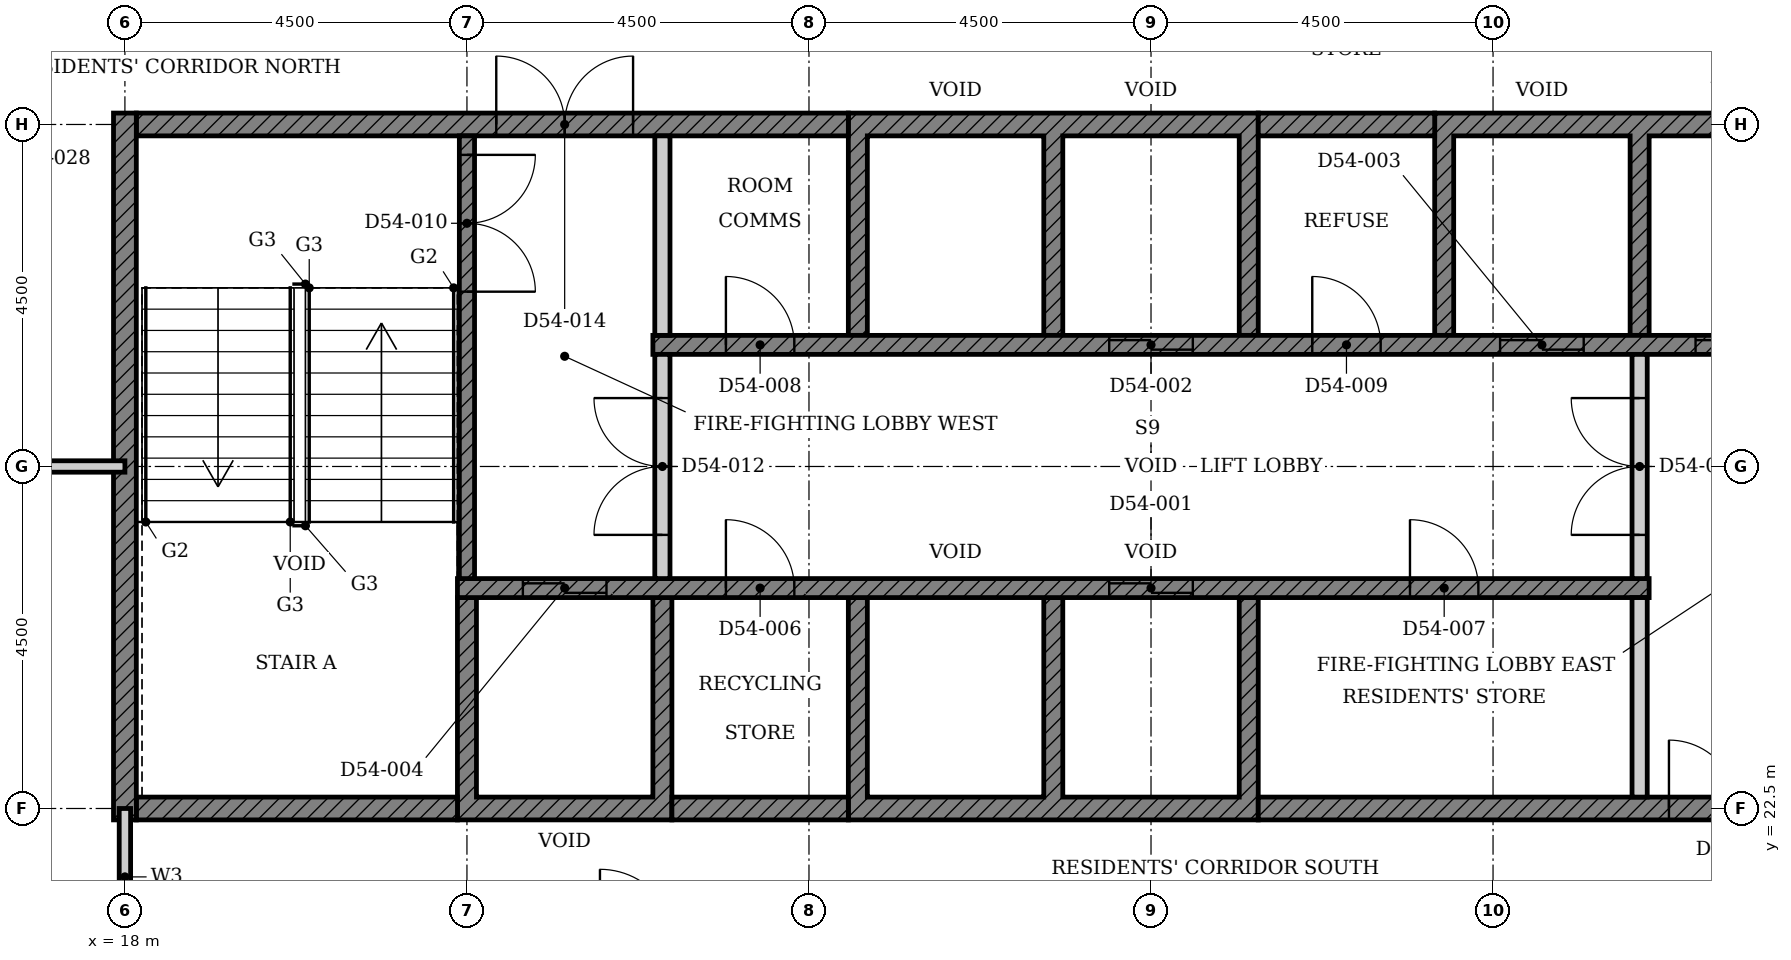
"""IFC4 building model, lengths in metres.
Left out: names, types, materials, properties, quantities, classifications, styles, units other than length and angle.
Written with IfcOpenShell. Run it as: python <this file> out.ifc"""

import sys

from ifc_helpers import new_model, si_unit, direction, frame, frame_2d, origin, place, context, subcontext, project, spatial, polyline, rectangle, outline, extrude, element, fill, save


model = new_model("IFC4")
c1 = context("Model", 3, precision=1e-05, world=origin(), true_north=direction((0.0, 1.0)))
c2 = subcontext(c1, "Body", "Model", "MODEL_VIEW")
j1 = project(units=[si_unit("LENGTHUNIT", "METRE"), si_unit("PLANEANGLEUNIT", "RADIAN")], contexts=[c1])
p1 = place(None, origin())
s1 = spatial("IfcSite", under=j1, at=p1, CompositionType="ELEMENT")
p2 = place(p1, origin())
s2 = spatial("IfcBuilding", under=s1, at=p2, CompositionType="ELEMENT")
p3 = place(p2, frame((0.0, 0.0, 214.6)))
s3 = spatial("IfcBuildingStorey", under=s2, at=p3, CompositionType="ELEMENT", Elevation=214.6)
p4 = place(p3, origin())
e1 = element("IfcWall", 1, at=p4, inside=s3, PredefinedType="SHEAR", context=c2, shape_type="SweptSolid", body=[
    extrude(outline(polyline([(22.375, 22.35), (25.197, 22.35), (25.197, 25.275), (24.947, 25.275), (24.947, 22.65), (22.625, 22.65), (22.625, 25.275), (22.375, 25.275), (22.375, 22.35)])), origin(), (0.0, 0.0, 1.0), 3.4),
])
p5 = place(p3, origin())
e2 = element("IfcWall", 2, at=p5, inside=s3, PredefinedType="SHEAR", context=c2, shape_type="SweptSolid", body=[
    extrude(outline(polyline([(27.518, 22.35), (32.911, 22.35), (32.911, 25.275), (32.661, 25.275), (32.661, 22.65), (30.339, 22.65), (30.339, 25.275), (30.089, 25.275), (30.089, 22.65), (27.768, 22.65), (27.768, 25.275), (27.518, 25.275), (27.518, 22.35)])), origin(), (0.0, 0.0, 1.0), 3.4),
])
p6 = place(p3, origin())
e3 = element("IfcWall", 3, at=p6, inside=s3, PredefinedType="SHEAR", context=c2, shape_type="SweptSolid", body=[
    extrude(outline(polyline([(27.518, 28.725), (27.768, 28.725), (27.768, 31.35), (30.089, 31.35), (30.089, 28.725), (30.339, 28.725), (30.339, 31.35), (32.661, 31.35), (32.661, 28.725), (32.911, 28.725), (32.911, 31.65), (27.518, 31.65), (27.518, 28.725)])), origin(), (0.0, 0.0, 1.0), 3.4),
])
p7 = place(p3, origin())
e4 = element("IfcWall", 4, at=p7, inside=s3, PredefinedType="SHEAR", context=c2, shape_type="SweptSolid", body=[
    extrude(outline(polyline([(35.232, 28.725), (35.482, 28.725), (35.482, 31.35), (37.803, 31.35), (37.803, 28.725), (38.053, 28.725), (38.053, 31.35), (40.375, 31.35), (40.375, 28.725), (40.625, 28.725), (40.625, 31.65), (35.232, 31.65), (35.232, 28.725)])), origin(), (0.0, 0.0, 1.0), 3.4),
])
p8 = place(p3, frame((18.15, 22.5, 0.0), z_axis=(0.0, 0.0, 1.0), x_axis=(1.0, 0.0, 0.0)))
e5 = element("IfcWall", 5, at=p8, inside=s3, PredefinedType="SHEAR", context=c2, shape_type="SweptSolid", body=[
    extrude(rectangle(XDim=4.225, YDim=0.3, at=frame_2d((2.113, 0.0))), origin(), (0.0, 0.0, 1.0), 3.4),
])
p9 = place(p3, frame((25.197, 22.5, 0.0), z_axis=(0.0, 0.0, 1.0), x_axis=(1.0, 0.0, 0.0)))
e6 = element("IfcWall", 6, at=p9, inside=s3, PredefinedType="SHEAR", context=c2, shape_type="SweptSolid", body=[
    extrude(rectangle(XDim=2.321, YDim=0.3, at=frame_2d((1.161, 0.0))), origin(), (0.0, 0.0, 1.0), 3.4),
])
p10 = place(p3, frame((32.911, 22.5, 0.0), z_axis=(0.0, 0.0, 1.0), x_axis=(1.0, 0.0, 0.0)))
e7 = element("IfcWall", 7, at=p10, inside=s3, PredefinedType="SHEAR", context=c2, shape_type="SweptSolid", body=[
    extrude(rectangle(XDim=11.939, YDim=0.3, at=frame_2d((5.97, 0.0))), origin(), (0.0, 0.0, 1.0), 3.4),
])
p11 = place(p10, frame((5.404, 0.0, 0.0)))
e8 = element("IfcOpeningElement", 8, at=p11, cuts=e7, PredefinedType="OPENING", context=c2, shape_type="SweptSolid", body=[
    extrude(rectangle(XDim=1.8, YDim=2.1, at=frame_2d((0.9, 1.05))), frame((0.0, 0.16, 0.0), z_axis=(0.0, -1.0, 0.0), x_axis=(1.0, 0.0, 0.0)), (0.0, 0.0, 1.0), 0.32),
])
p12 = place(p3, frame((18.15, 31.5, 0.0), z_axis=(0.0, 0.0, 1.0), x_axis=(1.0, 0.0, 0.0)))
e9 = element("IfcWall", 9, at=p12, inside=s3, PredefinedType="SHEAR", context=c2, shape_type="SweptSolid", body=[
    extrude(rectangle(XDim=9.368, YDim=0.3, at=frame_2d((4.684, 0.0))), origin(), (0.0, 0.0, 1.0), 3.4),
])
p13 = place(p12, frame((4.736, 0.0, 0.0)))
e10 = element("IfcOpeningElement", 10, at=p13, cuts=e9, PredefinedType="OPENING", context=c2, shape_type="SweptSolid", body=[
    extrude(rectangle(XDim=1.8, YDim=2.1, at=frame_2d((0.9, 1.05))), frame((0.0, 0.16, 0.0), z_axis=(0.0, -1.0, 0.0), x_axis=(1.0, 0.0, 0.0)), (0.0, 0.0, 1.0), 0.32),
])
p14 = place(p3, frame((32.911, 31.5, 0.0), z_axis=(0.0, 0.0, 1.0), x_axis=(1.0, 0.0, 0.0)))
e11 = element("IfcWall", 11, at=p14, inside=s3, PredefinedType="SHEAR", context=c2, shape_type="SweptSolid", body=[
    extrude(rectangle(XDim=2.322, YDim=0.3, at=frame_2d((1.161, 0.0))), origin(), (0.0, 0.0, 1.0), 3.4),
])
p15 = place(p3, frame((18.0, 22.35, 0.0), z_axis=(0.0, 0.0, 1.0), x_axis=(0.0, 1.0, 0.0)))
e12 = element("IfcWall", 12, at=p15, inside=s3, PredefinedType="SHEAR", context=c2, shape_type="SweptSolid", body=[
    extrude(rectangle(XDim=9.3, YDim=0.3, at=frame_2d((4.65, 0.0))), origin(), (0.0, 0.0, 1.0), 3.4),
])
p16 = place(p3, frame((22.375, 25.4, 0.0), z_axis=(0.0, 0.0, 1.0), x_axis=(1.0, 0.0, 0.0)))
e13 = element("IfcWall", 13, at=p16, inside=s3, PredefinedType="SHEAR", context=c2, shape_type="SweptSolid", body=[
    extrude(rectangle(XDim=15.678, YDim=0.25, at=frame_2d((7.839, 0.0))), origin(), (0.0, 0.0, 1.0), 3.4),
])
p17 = place(p16, frame((8.575, 0.0, 0.0)))
e14 = element("IfcOpeningElement", 14, at=p17, cuts=e13, PredefinedType="OPENING", context=c2, shape_type="SweptSolid", body=[
    extrude(rectangle(XDim=1.1, YDim=2.1, at=frame_2d((0.55, 1.05))), frame((0.0, 0.135, 0.0), z_axis=(0.0, -1.0, 0.0), x_axis=(1.0, 0.0, 0.0)), (0.0, 0.0, 1.0), 0.27),
])
p18 = place(p16, frame((0.861, 0.0, 0.0)))
e15 = element("IfcOpeningElement", 15, at=p18, cuts=e13, PredefinedType="OPENING", context=c2, shape_type="SweptSolid", body=[
    extrude(rectangle(XDim=1.1, YDim=2.1, at=frame_2d((0.55, 1.05))), frame((0.0, 0.135, 0.0), z_axis=(0.0, -1.0, 0.0), x_axis=(1.0, 0.0, 0.0)), (0.0, 0.0, 1.0), 0.27),
])
p19 = place(p16, frame((3.532, 0.0, 0.0)))
e16 = element("IfcOpeningElement", 16, at=p19, cuts=e13, PredefinedType="OPENING", context=c2, shape_type="SweptSolid", body=[
    extrude(rectangle(XDim=0.9, YDim=2.1, at=frame_2d((0.45, 1.05))), frame((0.0, 0.135, 0.0), z_axis=(0.0, -1.0, 0.0), x_axis=(1.0, 0.0, 0.0)), (0.0, 0.0, 1.0), 0.27),
])
p20 = place(p16, frame((12.532, 0.0, 0.0)))
e17 = element("IfcOpeningElement", 17, at=p20, cuts=e13, PredefinedType="OPENING", context=c2, shape_type="SweptSolid", body=[
    extrude(rectangle(XDim=0.9, YDim=2.1, at=frame_2d((0.45, 1.05))), frame((0.0, 0.135, 0.0), z_axis=(0.0, -1.0, 0.0), x_axis=(1.0, 0.0, 0.0)), (0.0, 0.0, 1.0), 0.27),
])
p21 = place(p3, frame((24.947, 28.6, 0.0), z_axis=(0.0, 0.0, 1.0), x_axis=(1.0, 0.0, 0.0)))
e18 = element("IfcWall", 18, at=p21, inside=s3, PredefinedType="SHEAR", context=c2, shape_type="SweptSolid", body=[
    extrude(rectangle(XDim=15.678, YDim=0.25, at=frame_2d((7.839, 0.0))), origin(), (0.0, 0.0, 1.0), 3.4),
])
p22 = place(p21, frame((6.004, 0.0, 0.0)))
e19 = element("IfcOpeningElement", 19, at=p22, cuts=e18, PredefinedType="OPENING", context=c2, shape_type="SweptSolid", body=[
    extrude(rectangle(XDim=1.1, YDim=2.1, at=frame_2d((0.55, 1.05))), frame((0.0, 0.135, 0.0), z_axis=(0.0, -1.0, 0.0), x_axis=(1.0, 0.0, 0.0)), (0.0, 0.0, 1.0), 0.27),
])
p23 = place(p21, frame((11.146, 0.0, 0.0)))
e20 = element("IfcOpeningElement", 20, at=p23, cuts=e18, PredefinedType="OPENING", context=c2, shape_type="SweptSolid", body=[
    extrude(rectangle(XDim=1.1, YDim=2.1, at=frame_2d((0.55, 1.05))), frame((0.0, 0.135, 0.0), z_axis=(0.0, -1.0, 0.0), x_axis=(1.0, 0.0, 0.0)), (0.0, 0.0, 1.0), 0.27),
])
p24 = place(p21, frame((13.718, 0.0, 0.0)))
e21 = element("IfcOpeningElement", 21, at=p24, cuts=e18, PredefinedType="OPENING", context=c2, shape_type="SweptSolid", body=[
    extrude(rectangle(XDim=1.1, YDim=2.1, at=frame_2d((0.55, 1.05))), frame((0.0, 0.135, 0.0), z_axis=(0.0, -1.0, 0.0), x_axis=(1.0, 0.0, 0.0)), (0.0, 0.0, 1.0), 0.27),
])
p25 = place(p21, frame((0.961, 0.0, 0.0)))
e22 = element("IfcOpeningElement", 22, at=p25, cuts=e18, PredefinedType="OPENING", context=c2, shape_type="SweptSolid", body=[
    extrude(rectangle(XDim=0.9, YDim=2.1, at=frame_2d((0.45, 1.05))), frame((0.0, 0.135, 0.0), z_axis=(0.0, -1.0, 0.0), x_axis=(1.0, 0.0, 0.0)), (0.0, 0.0, 1.0), 0.27),
])
p26 = place(p21, frame((8.675, 0.0, 0.0)))
e23 = element("IfcOpeningElement", 23, at=p26, cuts=e18, PredefinedType="OPENING", context=c2, shape_type="SweptSolid", body=[
    extrude(rectangle(XDim=0.9, YDim=2.1, at=frame_2d((0.45, 1.05))), frame((0.0, 0.135, 0.0), z_axis=(0.0, -1.0, 0.0), x_axis=(1.0, 0.0, 0.0)), (0.0, 0.0, 1.0), 0.27),
])
for number, where, z_axis, x_axis in (
    (24, (37.928, 22.65, 0.0), (0.0, 0.0, 1.0), (0.0, 1.0, 0.0)),
    (25, (25.072, 28.725, 0.0), (0.0, 0.0, 1.0), (0.0, 1.0, 0.0)),
):
    element("IfcWall", number, at=place(p3, frame(where, z_axis=z_axis, x_axis=x_axis)), inside=s3, PredefinedType="PARTITIONING", context=c2, shape_type="SweptSolid", body=[
        extrude(rectangle(XDim=2.625, YDim=0.2, at=frame_2d((1.312, 0.0))), origin(), (0.0, 0.0, 1.0), 3.4),
    ])
p27 = place(p3, frame((22.5, 31.35, 0.0), z_axis=(0.0, 0.0, 1.0), x_axis=(0.0, -1.0, 0.0)))
e26 = element("IfcWall", 26, at=p27, inside=s3, PredefinedType="SHEAR", context=c2, shape_type="SweptSolid", body=[
    extrude(rectangle(XDim=5.825, YDim=0.2, at=frame_2d((2.913, 0.0))), origin(), (0.0, 0.0, 1.0), 3.4),
])
p28 = place(p27, frame((0.25, 0.0, 0.0)))
e27 = element("IfcOpeningElement", 27, at=p28, cuts=e26, PredefinedType="OPENING", context=c2, shape_type="SweptSolid", body=[
    extrude(rectangle(XDim=1.8, YDim=2.1, at=frame_2d((0.9, 1.05))), frame((0.0, 0.11, 0.0), z_axis=(0.0, -1.0, 0.0), x_axis=(1.0, 0.0, 0.0)), (0.0, 0.0, 1.0), 0.22),
])
p29 = place(p3, frame((25.072, 25.525, 0.0), z_axis=(0.0, 0.0, 1.0), x_axis=(0.0, 1.0, 0.0)))
e28 = element("IfcWall", 28, at=p29, inside=s3, PredefinedType="PARTITIONING", context=c2, shape_type="SweptSolid", body=[
    extrude(rectangle(XDim=2.95, YDim=0.2, at=frame_2d((1.475, 0.0))), origin(), (0.0, 0.0, 1.0), 3.4),
])
p30 = place(p29, frame((0.575, 0.0, 0.0)))
e29 = element("IfcOpeningElement", 29, at=p30, cuts=e28, PredefinedType="OPENING", context=c2, shape_type="SweptSolid", body=[
    extrude(rectangle(XDim=1.8, YDim=2.1, at=frame_2d((0.9, 1.05))), frame((0.0, 0.11, 0.0), z_axis=(0.0, -1.0, 0.0), x_axis=(1.0, 0.0, 0.0)), (0.0, 0.0, 1.0), 0.22),
])
p31 = place(p3, frame((37.928, 25.525, 0.0), z_axis=(0.0, 0.0, 1.0), x_axis=(0.0, 1.0, 0.0)))
e30 = element("IfcWall", 30, at=p31, inside=s3, PredefinedType="PARTITIONING", context=c2, shape_type="SweptSolid", body=[
    extrude(rectangle(XDim=2.95, YDim=0.2, at=frame_2d((1.475, 0.0))), origin(), (0.0, 0.0, 1.0), 3.4),
])
p32 = place(p31, frame((0.575, 0.0, 0.0)))
e31 = element("IfcOpeningElement", 31, at=p32, cuts=e30, PredefinedType="OPENING", context=c2, shape_type="SweptSolid", body=[
    extrude(rectangle(XDim=1.8, YDim=2.1, at=frame_2d((0.9, 1.05))), frame((0.0, 0.11, 0.0), z_axis=(0.0, -1.0, 0.0), x_axis=(1.0, 0.0, 0.0)), (0.0, 0.0, 1.0), 0.22),
])
p33 = place(p3, frame((4.5, 27.0, 0.0), z_axis=(0.0, 0.0, 1.0), x_axis=(1.0, 0.0, 0.0)))
e32 = element("IfcWall", 32, at=p33, inside=s3, PredefinedType="PARTITIONING", context=c2, shape_type="SweptSolid", body=[
    extrude(rectangle(XDim=13.5, YDim=0.15, at=frame_2d((6.75, 0.0))), origin(), (0.0, 0.0, 1.0), 2.68),
])
p34 = place(p33, frame((5.35, 0.0, 0.0)))
e33 = element("IfcOpeningElement", 33, at=p34, cuts=e32, PredefinedType="OPENING", context=c2, shape_type="SweptSolid", body=[
    extrude(rectangle(XDim=1.0, YDim=2.1, at=frame_2d((0.5, 1.05))), frame((0.0, 0.085, 0.0), z_axis=(0.0, -1.0, 0.0), x_axis=(1.0, 0.0, 0.0)), (0.0, 0.0, 1.0), 0.17),
])
p35 = place(p3, frame((18.0, 20.7, 0.0), z_axis=(0.0, 0.0, 1.0), x_axis=(0.0, 1.0, 0.0)))
e34 = element("IfcWall", 34, at=p35, inside=s3, PredefinedType="PARTITIONING", context=c2, shape_type="SweptSolid", body=[
    extrude(rectangle(XDim=1.8, YDim=0.15, at=frame_2d((0.9, 0.0))), origin(), (0.0, 0.0, 1.0), 3.4),
])
p36 = place(p17, origin())
e35 = element("IfcDoor", 35, at=p36, inside=s3, OperationType="DOUBLE_DOOR_SLIDING", PredefinedType="DOOR", context=c2, shape_type="SweptSolid", body=[
    extrude(rectangle(XDim=1.1, YDim=2.1, at=frame_2d((0.55, 1.05))), frame((0.0, 0.025, 0.0), z_axis=(0.0, -1.0, 0.0), x_axis=(1.0, 0.0, 0.0)), (0.0, 0.0, 1.0), 0.05),
])
fill(e14, e35)
p37 = place(p22, origin())
e36 = element("IfcDoor", 36, at=p37, inside=s3, OperationType="DOUBLE_DOOR_SLIDING", PredefinedType="DOOR", context=c2, shape_type="SweptSolid", body=[
    extrude(rectangle(XDim=1.1, YDim=2.1, at=frame_2d((0.55, 1.05))), frame((0.0, 0.025, 0.0), z_axis=(0.0, -1.0, 0.0), x_axis=(1.0, 0.0, 0.0)), (0.0, 0.0, 1.0), 0.05),
])
fill(e19, e36)
p38 = place(p23, origin())
e37 = element("IfcDoor", 37, at=p38, inside=s3, OperationType="DOUBLE_DOOR_SLIDING", PredefinedType="DOOR", context=c2, shape_type="SweptSolid", body=[
    extrude(rectangle(XDim=1.1, YDim=2.1, at=frame_2d((0.55, 1.05))), frame((0.0, 0.025, 0.0), z_axis=(0.0, -1.0, 0.0), x_axis=(1.0, 0.0, 0.0)), (0.0, 0.0, 1.0), 0.05),
])
fill(e20, e37)
p39 = place(p18, origin())
e38 = element("IfcDoor", 38, at=p39, inside=s3, OperationType="DOUBLE_DOOR_SLIDING", PredefinedType="DOOR", context=c2, shape_type="SweptSolid", body=[
    extrude(rectangle(XDim=1.1, YDim=2.1, at=frame_2d((0.55, 1.05))), frame((0.0, 0.025, 0.0), z_axis=(0.0, -1.0, 0.0), x_axis=(1.0, 0.0, 0.0)), (0.0, 0.0, 1.0), 0.05),
])
fill(e15, e38)
p40 = place(p24, origin())
e39 = element("IfcDoor", 39, at=p40, inside=s3, OperationType="DOUBLE_DOOR_SLIDING", PredefinedType="DOOR", context=c2, shape_type="SweptSolid", body=[
    extrude(rectangle(XDim=1.1, YDim=2.1, at=frame_2d((0.55, 1.05))), frame((0.0, 0.025, 0.0), z_axis=(0.0, -1.0, 0.0), x_axis=(1.0, 0.0, 0.0)), (0.0, 0.0, 1.0), 0.05),
])
fill(e21, e39)
p41 = place(p19, origin())
e40 = element("IfcDoor", 40, at=p41, inside=s3, OperationType="SINGLE_SWING_LEFT", PredefinedType="DOOR", context=c2, shape_type="SweptSolid", body=[
    extrude(rectangle(XDim=0.9, YDim=2.1, at=frame_2d((0.45, 1.05))), frame((0.0, 0.025, 0.0), z_axis=(0.0, -1.0, 0.0), x_axis=(1.0, 0.0, 0.0)), (0.0, 0.0, 1.0), 0.05),
])
fill(e16, e40)
p42 = place(p20, origin())
e41 = element("IfcDoor", 41, at=p42, inside=s3, OperationType="SINGLE_SWING_LEFT", PredefinedType="DOOR", context=c2, shape_type="SweptSolid", body=[
    extrude(rectangle(XDim=0.9, YDim=2.1, at=frame_2d((0.45, 1.05))), frame((0.0, 0.025, 0.0), z_axis=(0.0, -1.0, 0.0), x_axis=(1.0, 0.0, 0.0)), (0.0, 0.0, 1.0), 0.05),
])
fill(e17, e41)
p43 = place(p25, origin())
e42 = element("IfcDoor", 42, at=p43, inside=s3, OperationType="SINGLE_SWING_LEFT", PredefinedType="DOOR", context=c2, shape_type="SweptSolid", body=[
    extrude(rectangle(XDim=0.9, YDim=2.1, at=frame_2d((0.45, 1.05))), frame((0.0, 0.025, 0.0), z_axis=(0.0, -1.0, 0.0), x_axis=(1.0, 0.0, 0.0)), (0.0, 0.0, 1.0), 0.05),
])
fill(e22, e42)
p44 = place(p26, origin())
e43 = element("IfcDoor", 43, at=p44, inside=s3, OperationType="SINGLE_SWING_LEFT", PredefinedType="DOOR", context=c2, shape_type="SweptSolid", body=[
    extrude(rectangle(XDim=0.9, YDim=2.1, at=frame_2d((0.45, 1.05))), frame((0.0, 0.025, 0.0), z_axis=(0.0, -1.0, 0.0), x_axis=(1.0, 0.0, 0.0)), (0.0, 0.0, 1.0), 0.05),
])
fill(e23, e43)
p45 = place(p28, origin())
e44 = element("IfcDoor", 44, at=p45, inside=s3, OperationType="DOUBLE_DOOR_SINGLE_SWING", PredefinedType="DOOR", context=c2, shape_type="SweptSolid", body=[
    extrude(rectangle(XDim=1.8, YDim=2.1, at=frame_2d((0.9, 1.05))), frame((0.0, 0.025, 0.0), z_axis=(0.0, -1.0, 0.0), x_axis=(1.0, 0.0, 0.0)), (0.0, 0.0, 1.0), 0.05),
])
fill(e27, e44)
p46 = place(p30, origin())
e45 = element("IfcDoor", 45, at=p46, inside=s3, OperationType="DOUBLE_DOOR_SINGLE_SWING", PredefinedType="DOOR", context=c2, shape_type="SweptSolid", body=[
    extrude(rectangle(XDim=1.8, YDim=2.1, at=frame_2d((0.9, 1.05))), frame((0.0, 0.025, 0.0), z_axis=(0.0, -1.0, 0.0), x_axis=(1.0, 0.0, 0.0)), (0.0, 0.0, 1.0), 0.05),
])
fill(e29, e45)
p47 = place(p32, origin())
e46 = element("IfcDoor", 46, at=p47, inside=s3, OperationType="DOUBLE_DOOR_SINGLE_SWING", PredefinedType="DOOR", context=c2, shape_type="SweptSolid", body=[
    extrude(rectangle(XDim=1.8, YDim=2.1, at=frame_2d((0.9, 1.05))), frame((0.0, 0.025, 0.0), z_axis=(0.0, -1.0, 0.0), x_axis=(1.0, 0.0, 0.0)), (0.0, 0.0, 1.0), 0.05),
])
fill(e31, e46)
p48 = place(p13, origin())
e47 = element("IfcDoor", 47, at=p48, inside=s3, OperationType="DOUBLE_DOOR_SINGLE_SWING", PredefinedType="DOOR", context=c2, shape_type="SweptSolid", body=[
    extrude(rectangle(XDim=1.8, YDim=2.1, at=frame_2d((0.9, 1.05))), frame((0.0, 0.025, 0.0), z_axis=(0.0, -1.0, 0.0), x_axis=(1.0, 0.0, 0.0)), (0.0, 0.0, 1.0), 0.05),
])
fill(e10, e47)
p49 = place(p11, origin())
e48 = element("IfcDoor", 48, at=p49, inside=s3, OperationType="DOUBLE_DOOR_SINGLE_SWING", PredefinedType="DOOR", context=c2, shape_type="SweptSolid", body=[
    extrude(rectangle(XDim=1.8, YDim=2.1, at=frame_2d((0.9, 1.05))), frame((0.0, 0.025, 0.0), z_axis=(0.0, -1.0, 0.0), x_axis=(1.0, 0.0, 0.0)), (0.0, 0.0, 1.0), 0.05),
])
fill(e8, e48)
save(model, sys.argv[1])
